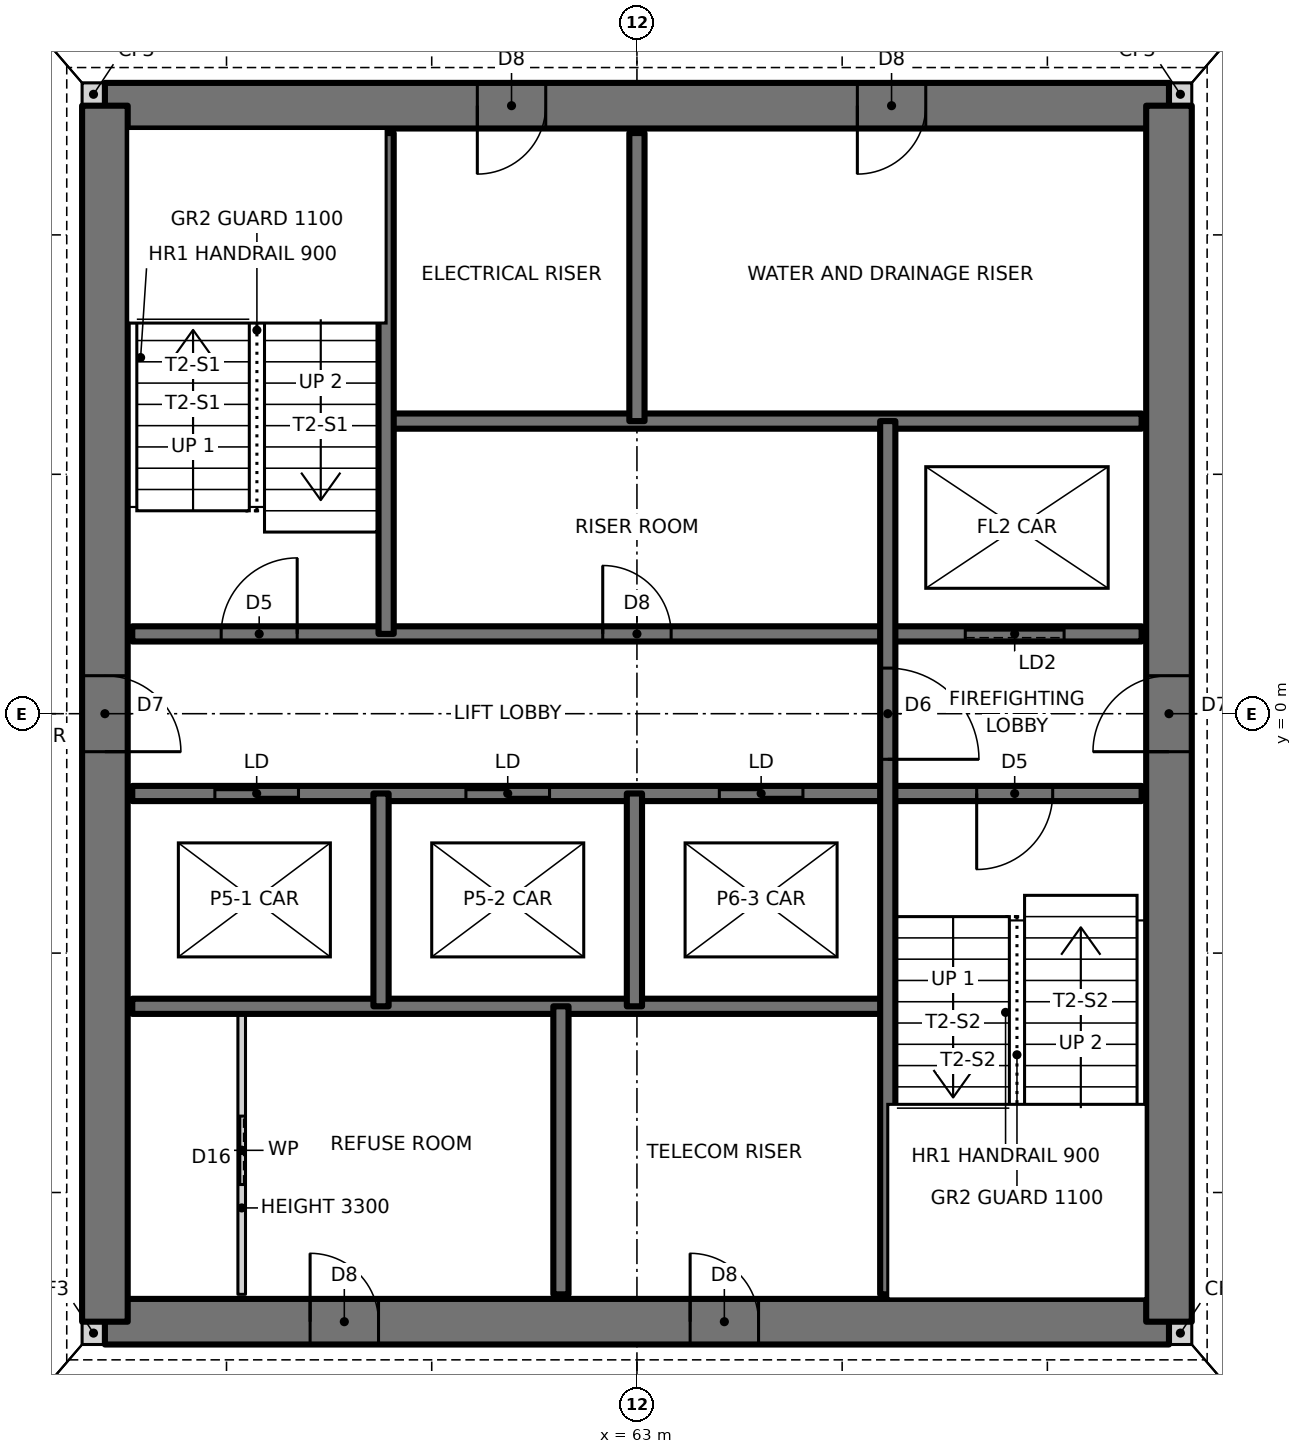
"""IFC4 building model, lengths in metres.
Left out: names, types, materials, properties, quantities, classifications, styles, units other than length and angle.
Written with IfcOpenShell. Run it as: python <this file> out.ifc"""

import sys

from ifc_helpers import new_model, si_unit, direction, frame, frame_2d, origin, place, context, subcontext, project, spatial, rectangle, extrude, element, fill, save


model = new_model("IFC4")
c1 = context("Model", 3, precision=1e-05, world=origin(), true_north=direction((0.0, 1.0)))
c2 = subcontext(c1, "Body", "Model", "MODEL_VIEW")
j1 = project(units=[si_unit("LENGTHUNIT", "METRE"), si_unit("PLANEANGLEUNIT", "RADIAN")], contexts=[c1])
p1 = place(None, origin())
s1 = spatial("IfcSite", under=j1, at=p1, CompositionType="ELEMENT")
p2 = place(p1, origin())
s2 = spatial("IfcBuilding", under=s1, at=p2, CompositionType="ELEMENT")
p3 = place(p2, frame((0.0, 0.0, 39.5)))
s3 = spatial("IfcBuildingStorey", under=s2, at=p3, CompositionType="ELEMENT", Elevation=39.5)
for number, where, z_axis, x_axis in (
    (1, (55.7, -8.15, 0.0), (0.0, 0.0, 1.0), (1.0, 0.0, 0.0)),
    (2, (70.0, -8.15, 0.0), (0.0, 0.0, 1.0), (1.0, 0.0, 0.0)),
    (3, (70.0, 8.15, 0.0), (0.0, 0.0, 1.0), (1.0, 0.0, 0.0)),
    (4, (55.7, 8.15, 0.0), (0.0, 0.0, 1.0), (1.0, 0.0, 0.0)),
):
    element("IfcWall", number, at=place(p3, frame(where, z_axis=z_axis, x_axis=x_axis)), inside=s3, PredefinedType="SOLIDWALL", context=c2, shape_type="SweptSolid", body=[
        extrude(rectangle(XDim=0.3, YDim=0.3, at=frame_2d((0.15, 0.0))), origin(), (0.0, 0.0, 1.0), 3.5),
    ])
p4 = place(p3, frame((56.0, -8.0, 0.0), z_axis=(0.0, 0.0, 1.0), x_axis=(1.0, 0.0, 0.0)))
e5 = element("IfcWall", 5, at=p4, inside=s3, PredefinedType="SHEAR", context=c2, shape_type="SweptSolid", body=[
    extrude(rectangle(XDim=14.0, YDim=0.6, at=frame_2d((7.0, 0.0))), origin(), (0.0, 0.0, 1.0), 3.5),
])
p5 = place(p4, frame((2.7, 0.0, 0.0)))
e6 = element("IfcOpeningElement", 6, at=p5, cuts=e5, PredefinedType="OPENING", context=c2, shape_type="SweptSolid", body=[
    extrude(rectangle(XDim=0.9, YDim=2.1, at=frame_2d((0.45, 1.05))), frame((0.0, 0.31, 0.0), z_axis=(0.0, -1.0, 0.0), x_axis=(1.0, 0.0, 0.0)), (0.0, 0.0, 1.0), 0.62),
])
p6 = place(p4, frame((7.7, 0.0, 0.0)))
e7 = element("IfcOpeningElement", 7, at=p6, cuts=e5, PredefinedType="OPENING", context=c2, shape_type="SweptSolid", body=[
    extrude(rectangle(XDim=0.9, YDim=2.1, at=frame_2d((0.45, 1.05))), frame((0.0, 0.31, 0.0), z_axis=(0.0, -1.0, 0.0), x_axis=(1.0, 0.0, 0.0)), (0.0, 0.0, 1.0), 0.62),
])
p7 = place(p3, frame((70.0, 8.0, 0.0), z_axis=(0.0, 0.0, 1.0), x_axis=(-1.0, 0.0, 0.0)))
e8 = element("IfcWall", 8, at=p7, inside=s3, PredefinedType="SHEAR", context=c2, shape_type="SweptSolid", body=[
    extrude(rectangle(XDim=14.0, YDim=0.6, at=frame_2d((7.0, 0.0))), origin(), (0.0, 0.0, 1.0), 3.5),
])
p8 = place(p7, frame((8.2, 0.0, 0.0)))
e9 = element("IfcOpeningElement", 9, at=p8, cuts=e8, PredefinedType="OPENING", context=c2, shape_type="SweptSolid", body=[
    extrude(rectangle(XDim=0.9, YDim=2.1, at=frame_2d((0.45, 1.05))), frame((0.0, 0.31, 0.0), z_axis=(0.0, -1.0, 0.0), x_axis=(1.0, 0.0, 0.0)), (0.0, 0.0, 1.0), 0.62),
])
p9 = place(p7, frame((3.2, 0.0, 0.0)))
e10 = element("IfcOpeningElement", 10, at=p9, cuts=e8, PredefinedType="OPENING", context=c2, shape_type="SweptSolid", body=[
    extrude(rectangle(XDim=0.9, YDim=2.1, at=frame_2d((0.45, 1.05))), frame((0.0, 0.31, 0.0), z_axis=(0.0, -1.0, 0.0), x_axis=(1.0, 0.0, 0.0)), (0.0, 0.0, 1.0), 0.62),
])
p10 = place(p3, frame((70.0, -8.0, 0.0), z_axis=(0.0, 0.0, 1.0), x_axis=(0.0, 1.0, 0.0)))
e11 = element("IfcWall", 11, at=p10, inside=s3, PredefinedType="SHEAR", context=c2, shape_type="SweptSolid", body=[
    extrude(rectangle(XDim=16.0, YDim=0.6, at=frame_2d((8.0, 0.0))), origin(), (0.0, 0.0, 1.0), 3.5),
])
p11 = place(p10, frame((7.5, 0.0, 0.0)))
e12 = element("IfcOpeningElement", 12, at=p11, cuts=e11, PredefinedType="OPENING", context=c2, shape_type="SweptSolid", body=[
    extrude(rectangle(XDim=1.0, YDim=2.1, at=frame_2d((0.5, 1.05))), frame((0.0, 0.31, 0.0), z_axis=(0.0, -1.0, 0.0), x_axis=(1.0, 0.0, 0.0)), (0.0, 0.0, 1.0), 0.62),
])
p12 = place(p3, frame((56.0, 8.0, 0.0), z_axis=(0.0, 0.0, 1.0), x_axis=(0.0, -1.0, 0.0)))
e13 = element("IfcWall", 13, at=p12, inside=s3, PredefinedType="SHEAR", context=c2, shape_type="SweptSolid", body=[
    extrude(rectangle(XDim=16.0, YDim=0.6, at=frame_2d((8.0, 0.0))), origin(), (0.0, 0.0, 1.0), 3.5),
])
p13 = place(p12, frame((7.5, 0.0, 0.0)))
e14 = element("IfcOpeningElement", 14, at=p13, cuts=e13, PredefinedType="OPENING", context=c2, shape_type="SweptSolid", body=[
    extrude(rectangle(XDim=1.0, YDim=2.1, at=frame_2d((0.5, 1.05))), frame((0.0, 0.31, 0.0), z_axis=(0.0, -1.0, 0.0), x_axis=(1.0, 0.0, 0.0)), (0.0, 0.0, 1.0), 0.62),
])
p14 = place(p3, frame((56.36, -3.85, 0.0), z_axis=(0.0, 0.0, 1.0), x_axis=(1.0, 0.0, 0.0)))
e15 = element("IfcWall", 15, at=p14, inside=s3, PredefinedType="SOLIDWALL", context=c2, shape_type="SweptSolid", body=[
    extrude(rectangle(XDim=9.94, YDim=0.2, at=frame_2d((4.97, 0.0))), origin(), (0.0, 0.0, 1.0), 3.5),
])
p15 = place(p3, frame((56.36, -1.05, 0.0), z_axis=(0.0, 0.0, 1.0), x_axis=(1.0, 0.0, 0.0)))
e16 = element("IfcWall", 16, at=p15, inside=s3, PredefinedType="SOLIDWALL", context=c2, shape_type="SweptSolid", body=[
    extrude(rectangle(XDim=13.28, YDim=0.2, at=frame_2d((6.64, 0.0))), origin(), (0.0, 0.0, 1.0), 3.5),
])
p16 = place(p15, frame((11.11, 0.0, 0.0)))
e17 = element("IfcOpeningElement", 17, at=p16, cuts=e16, PredefinedType="OPENING", context=c2, shape_type="SweptSolid", body=[
    extrude(rectangle(XDim=1.0, YDim=2.1, at=frame_2d((0.5, 1.05))), frame((0.0, 0.11, 0.0), z_axis=(0.0, -1.0, 0.0), x_axis=(1.0, 0.0, 0.0)), (0.0, 0.0, 1.0), 0.22),
])
p17 = place(p15, frame((1.087, 0.0, 0.0)))
e18 = element("IfcOpeningElement", 18, at=p17, cuts=e16, PredefinedType="OPENING", context=c2, shape_type="SweptSolid", body=[
    extrude(rectangle(XDim=1.1, YDim=2.1, at=frame_2d((0.55, 1.05))), frame((0.0, 0.11, 0.0), z_axis=(0.0, -1.0, 0.0), x_axis=(1.0, 0.0, 0.0)), (0.0, 0.0, 1.0), 0.22),
])
p18 = place(p15, frame((4.39, 0.0, 0.0)))
e19 = element("IfcOpeningElement", 19, at=p18, cuts=e16, PredefinedType="OPENING", context=c2, shape_type="SweptSolid", body=[
    extrude(rectangle(XDim=1.1, YDim=2.1, at=frame_2d((0.55, 1.05))), frame((0.0, 0.11, 0.0), z_axis=(0.0, -1.0, 0.0), x_axis=(1.0, 0.0, 0.0)), (0.0, 0.0, 1.0), 0.22),
])
p19 = place(p15, frame((7.724, 0.0, 0.0)))
e20 = element("IfcOpeningElement", 20, at=p19, cuts=e16, PredefinedType="OPENING", context=c2, shape_type="SweptSolid", body=[
    extrude(rectangle(XDim=1.1, YDim=2.1, at=frame_2d((0.55, 1.05))), frame((0.0, 0.11, 0.0), z_axis=(0.0, -1.0, 0.0), x_axis=(1.0, 0.0, 0.0)), (0.0, 0.0, 1.0), 0.22),
])
p20 = place(p3, frame((56.36, 1.05, 0.0), z_axis=(0.0, 0.0, 1.0), x_axis=(1.0, 0.0, 0.0)))
e21 = element("IfcWall", 21, at=p20, inside=s3, PredefinedType="SOLIDWALL", context=c2, shape_type="SweptSolid", body=[
    extrude(rectangle(XDim=13.28, YDim=0.2, at=frame_2d((6.64, 0.0))), origin(), (0.0, 0.0, 1.0), 3.5),
])
p21 = place(p20, frame((1.17, 0.0, 0.0)))
e22 = element("IfcOpeningElement", 22, at=p21, cuts=e21, PredefinedType="OPENING", context=c2, shape_type="SweptSolid", body=[
    extrude(rectangle(XDim=1.0, YDim=2.1, at=frame_2d((0.5, 1.05))), frame((0.0, 0.11, 0.0), z_axis=(0.0, -1.0, 0.0), x_axis=(1.0, 0.0, 0.0)), (0.0, 0.0, 1.0), 0.22),
])
p22 = place(p20, frame((6.19, 0.0, 0.0)))
e23 = element("IfcOpeningElement", 23, at=p22, cuts=e21, PredefinedType="OPENING", context=c2, shape_type="SweptSolid", body=[
    extrude(rectangle(XDim=0.9, YDim=2.1, at=frame_2d((0.45, 1.05))), frame((0.0, 0.11, 0.0), z_axis=(0.0, -1.0, 0.0), x_axis=(1.0, 0.0, 0.0)), (0.0, 0.0, 1.0), 0.22),
])
p23 = place(p20, frame((10.96, 0.0, 0.0)))
e24 = element("IfcOpeningElement", 24, at=p23, cuts=e21, PredefinedType="OPENING", context=c2, shape_type="SweptSolid", body=[
    extrude(rectangle(XDim=1.3, YDim=2.1, at=frame_2d((0.65, 1.05))), frame((0.0, 0.11, 0.0), z_axis=(0.0, -1.0, 0.0), x_axis=(1.0, 0.0, 0.0)), (0.0, 0.0, 1.0), 0.22),
])
p24 = place(p3, frame((59.7, 3.85, 0.0), z_axis=(0.0, 0.0, 1.0), x_axis=(1.0, 0.0, 0.0)))
e25 = element("IfcWall", 25, at=p24, inside=s3, PredefinedType="SOLIDWALL", context=c2, shape_type="SweptSolid", body=[
    extrude(rectangle(XDim=9.94, YDim=0.2, at=frame_2d((4.97, 0.0))), origin(), (0.0, 0.0, 1.0), 3.5),
])
p25 = place(p3, frame((66.3, -7.64, 0.0), z_axis=(0.0, 0.0, 1.0), x_axis=(0.0, 1.0, 0.0)))
e26 = element("IfcWall", 26, at=p25, inside=s3, PredefinedType="SOLIDWALL", context=c2, shape_type="SweptSolid", body=[
    extrude(rectangle(XDim=11.49, YDim=0.2, at=frame_2d((5.745, 0.0))), origin(), (0.0, 0.0, 1.0), 3.5),
])
p26 = place(p25, frame((7.04, 0.0, 0.0)))
e27 = element("IfcOpeningElement", 27, at=p26, cuts=e26, PredefinedType="OPENING", context=c2, shape_type="SweptSolid", body=[
    extrude(rectangle(XDim=1.2, YDim=2.1, at=frame_2d((0.6, 1.05))), frame((0.0, 0.11, 0.0), z_axis=(0.0, -1.0, 0.0), x_axis=(1.0, 0.0, 0.0)), (0.0, 0.0, 1.0), 0.22),
])
p27 = place(p3, frame((63.0, 3.85, 0.0), z_axis=(0.0, 0.0, 1.0), x_axis=(0.0, 1.0, 0.0)))
e28 = element("IfcWall", 28, at=p27, inside=s3, PredefinedType="SOLIDWALL", context=c2, shape_type="SweptSolid", body=[
    extrude(rectangle(XDim=3.79, YDim=0.2, at=frame_2d((1.895, 0.0))), origin(), (0.0, 0.0, 1.0), 3.5),
])
p28 = place(p3, frame((62.967, -3.85, 0.0), z_axis=(0.0, 0.0, 1.0), x_axis=(0.0, 1.0, 0.0)))
e29 = element("IfcWall", 29, at=p28, inside=s3, PredefinedType="SOLIDWALL", context=c2, shape_type="SweptSolid", body=[
    extrude(rectangle(XDim=2.8, YDim=0.2, at=frame_2d((1.4, 0.0))), origin(), (0.0, 0.0, 1.0), 3.5),
])
p29 = place(p3, frame((62.0, -7.64, 0.0), z_axis=(0.0, 0.0, 1.0), x_axis=(0.0, 1.0, 0.0)))
e30 = element("IfcWall", 30, at=p29, inside=s3, PredefinedType="SOLIDWALL", context=c2, shape_type="SweptSolid", body=[
    extrude(rectangle(XDim=3.79, YDim=0.2, at=frame_2d((1.895, 0.0))), origin(), (0.0, 0.0, 1.0), 3.5),
])
p30 = place(p3, frame((59.7, 1.05, 0.0), z_axis=(0.0, 0.0, 1.0), x_axis=(0.0, 1.0, 0.0)))
e31 = element("IfcWall", 31, at=p30, inside=s3, PredefinedType="SOLIDWALL", context=c2, shape_type="SweptSolid", body=[
    extrude(rectangle(XDim=6.59, YDim=0.2, at=frame_2d((3.295, 0.0))), origin(), (0.0, 0.0, 1.0), 3.5),
])
p31 = place(p3, frame((59.633, -3.85, 0.0), z_axis=(0.0, 0.0, 1.0), x_axis=(0.0, 1.0, 0.0)))
e32 = element("IfcWall", 32, at=p31, inside=s3, PredefinedType="SOLIDWALL", context=c2, shape_type="SweptSolid", body=[
    extrude(rectangle(XDim=2.8, YDim=0.2, at=frame_2d((1.4, 0.0))), origin(), (0.0, 0.0, 1.0), 3.5),
])
p32 = place(p3, frame((57.8, -7.64, 0.0), z_axis=(0.0, 0.0, 1.0), x_axis=(0.0, 1.0, 0.0)))
e33 = element("IfcWall", 33, at=p32, inside=s3, PredefinedType="PARTITIONING", context=c2, shape_type="SweptSolid", body=[
    extrude(rectangle(XDim=3.79, YDim=0.1, at=frame_2d((1.895, 0.0))), origin(), (0.0, 0.0, 1.0), 3.3),
])
p33 = place(p32, frame((1.445, 0.0, 0.0)))
e34 = element("IfcOpeningElement", 34, at=p33, cuts=e33, PredefinedType="OPENING", context=c2, shape_type="SweptSolid", body=[
    extrude(rectangle(XDim=0.9, YDim=2.1, at=frame_2d((0.45, 1.05))), frame((0.0, 0.06, 0.0), z_axis=(0.0, -1.0, 0.0), x_axis=(1.0, 0.0, 0.0)), (0.0, 0.0, 1.0), 0.12),
])
p34 = place(p21, origin())
e35 = element("IfcDoor", 35, at=p34, inside=s3, OperationType="SINGLE_SWING_RIGHT", PredefinedType="DOOR", context=c2, shape_type="SweptSolid", body=[
    extrude(rectangle(XDim=1.0, YDim=2.1, at=frame_2d((0.5, 1.05))), frame((0.0, 0.025, 0.0), z_axis=(0.0, -1.0, 0.0), x_axis=(1.0, 0.0, 0.0)), (0.0, 0.0, 1.0), 0.05),
])
fill(e22, e35)
p35 = place(p16, frame((1.0, 0.0, 0.0), z_axis=(0.0, 0.0, 1.0), x_axis=(-1.0, 0.0, 0.0)))
e36 = element("IfcDoor", 36, at=p35, inside=s3, OperationType="SINGLE_SWING_RIGHT", PredefinedType="DOOR", context=c2, shape_type="SweptSolid", body=[
    extrude(rectangle(XDim=1.0, YDim=2.1, at=frame_2d((0.5, 1.05))), frame((0.0, 0.025, 0.0), z_axis=(0.0, -1.0, 0.0), x_axis=(1.0, 0.0, 0.0)), (0.0, 0.0, 1.0), 0.05),
])
fill(e17, e36)
p36 = place(p26, frame((1.2, 0.0, 0.0), z_axis=(0.0, 0.0, 1.0), x_axis=(-1.0, 0.0, 0.0)))
e37 = element("IfcDoor", 37, at=p36, inside=s3, OperationType="SINGLE_SWING_RIGHT", PredefinedType="DOOR", context=c2, shape_type="SweptSolid", body=[
    extrude(rectangle(XDim=1.2, YDim=2.1, at=frame_2d((0.6, 1.05))), frame((0.0, 0.025, 0.0), z_axis=(0.0, -1.0, 0.0), x_axis=(1.0, 0.0, 0.0)), (0.0, 0.0, 1.0), 0.05),
])
fill(e27, e37)
p37 = place(p22, origin())
e38 = element("IfcDoor", 38, at=p37, inside=s3, OperationType="SINGLE_SWING_LEFT", PredefinedType="DOOR", context=c2, shape_type="SweptSolid", body=[
    extrude(rectangle(XDim=0.9, YDim=2.1, at=frame_2d((0.45, 1.05))), frame((0.0, 0.025, 0.0), z_axis=(0.0, -1.0, 0.0), x_axis=(1.0, 0.0, 0.0)), (0.0, 0.0, 1.0), 0.05),
])
fill(e23, e38)
p38 = place(p33, origin())
e39 = element("IfcDoor", 39, at=p38, inside=s3, OperationType="SLIDING_TO_LEFT", PredefinedType="DOOR", context=c2, shape_type="SweptSolid", body=[
    extrude(rectangle(XDim=0.9, YDim=2.1, at=frame_2d((0.45, 1.05))), frame((0.0, 0.025, 0.0), z_axis=(0.0, -1.0, 0.0), x_axis=(1.0, 0.0, 0.0)), (0.0, 0.0, 1.0), 0.05),
])
fill(e34, e39)
p39 = place(p13, origin())
e40 = element("IfcDoor", 40, at=p39, inside=s3, OperationType="SINGLE_SWING_RIGHT", PredefinedType="DOOR", context=c2, shape_type="SweptSolid", body=[
    extrude(rectangle(XDim=1.0, YDim=2.1, at=frame_2d((0.5, 1.05))), frame((0.0, 0.025, 0.0), z_axis=(0.0, -1.0, 0.0), x_axis=(1.0, 0.0, 0.0)), (0.0, 0.0, 1.0), 0.05),
])
fill(e14, e40)
p40 = place(p11, origin())
e41 = element("IfcDoor", 41, at=p40, inside=s3, OperationType="SINGLE_SWING_LEFT", PredefinedType="DOOR", context=c2, shape_type="SweptSolid", body=[
    extrude(rectangle(XDim=1.0, YDim=2.1, at=frame_2d((0.5, 1.05))), frame((0.0, 0.025, 0.0), z_axis=(0.0, -1.0, 0.0), x_axis=(1.0, 0.0, 0.0)), (0.0, 0.0, 1.0), 0.05),
])
fill(e12, e41)
p41 = place(p8, origin())
e42 = element("IfcDoor", 42, at=p41, inside=s3, OperationType="SINGLE_SWING_RIGHT", PredefinedType="DOOR", context=c2, shape_type="SweptSolid", body=[
    extrude(rectangle(XDim=0.9, YDim=2.1, at=frame_2d((0.45, 1.05))), frame((0.0, 0.025, 0.0), z_axis=(0.0, -1.0, 0.0), x_axis=(1.0, 0.0, 0.0)), (0.0, 0.0, 1.0), 0.05),
])
fill(e9, e42)
p42 = place(p9, origin())
e43 = element("IfcDoor", 43, at=p42, inside=s3, OperationType="SINGLE_SWING_RIGHT", PredefinedType="DOOR", context=c2, shape_type="SweptSolid", body=[
    extrude(rectangle(XDim=0.9, YDim=2.1, at=frame_2d((0.45, 1.05))), frame((0.0, 0.025, 0.0), z_axis=(0.0, -1.0, 0.0), x_axis=(1.0, 0.0, 0.0)), (0.0, 0.0, 1.0), 0.05),
])
fill(e10, e43)
p43 = place(p5, origin())
e44 = element("IfcDoor", 44, at=p43, inside=s3, OperationType="SINGLE_SWING_LEFT", PredefinedType="DOOR", context=c2, shape_type="SweptSolid", body=[
    extrude(rectangle(XDim=0.9, YDim=2.1, at=frame_2d((0.45, 1.05))), frame((0.0, 0.025, 0.0), z_axis=(0.0, -1.0, 0.0), x_axis=(1.0, 0.0, 0.0)), (0.0, 0.0, 1.0), 0.05),
])
fill(e6, e44)
p44 = place(p6, origin())
e45 = element("IfcDoor", 45, at=p44, inside=s3, OperationType="SINGLE_SWING_LEFT", PredefinedType="DOOR", context=c2, shape_type="SweptSolid", body=[
    extrude(rectangle(XDim=0.9, YDim=2.1, at=frame_2d((0.45, 1.05))), frame((0.0, 0.025, 0.0), z_axis=(0.0, -1.0, 0.0), x_axis=(1.0, 0.0, 0.0)), (0.0, 0.0, 1.0), 0.05),
])
fill(e7, e45)
p45 = place(p17, origin())
e46 = element("IfcDoor", 46, at=p45, inside=s3, OperationType="DOUBLE_DOOR_SLIDING", PredefinedType="DOOR", context=c2, shape_type="SweptSolid", body=[
    extrude(rectangle(XDim=1.1, YDim=2.1, at=frame_2d((0.55, 1.05))), frame((0.0, 0.025, 0.0), z_axis=(0.0, -1.0, 0.0), x_axis=(1.0, 0.0, 0.0)), (0.0, 0.0, 1.0), 0.05),
])
fill(e18, e46)
p46 = place(p18, origin())
e47 = element("IfcDoor", 47, at=p46, inside=s3, OperationType="DOUBLE_DOOR_SLIDING", PredefinedType="DOOR", context=c2, shape_type="SweptSolid", body=[
    extrude(rectangle(XDim=1.1, YDim=2.1, at=frame_2d((0.55, 1.05))), frame((0.0, 0.025, 0.0), z_axis=(0.0, -1.0, 0.0), x_axis=(1.0, 0.0, 0.0)), (0.0, 0.0, 1.0), 0.05),
])
fill(e19, e47)
p47 = place(p19, origin())
e48 = element("IfcDoor", 48, at=p47, inside=s3, OperationType="DOUBLE_DOOR_SLIDING", PredefinedType="DOOR", context=c2, shape_type="SweptSolid", body=[
    extrude(rectangle(XDim=1.1, YDim=2.1, at=frame_2d((0.55, 1.05))), frame((0.0, 0.025, 0.0), z_axis=(0.0, -1.0, 0.0), x_axis=(1.0, 0.0, 0.0)), (0.0, 0.0, 1.0), 0.05),
])
fill(e20, e48)
p48 = place(p23, origin())
e49 = element("IfcDoor", 49, at=p48, inside=s3, OperationType="SLIDING_TO_LEFT", PredefinedType="DOOR", context=c2, shape_type="SweptSolid", body=[
    extrude(rectangle(XDim=1.3, YDim=2.1, at=frame_2d((0.65, 1.05))), frame((0.0, 0.025, 0.0), z_axis=(0.0, -1.0, 0.0), x_axis=(1.0, 0.0, 0.0)), (0.0, 0.0, 1.0), 0.05),
])
fill(e24, e49)
save(model, sys.argv[1])
